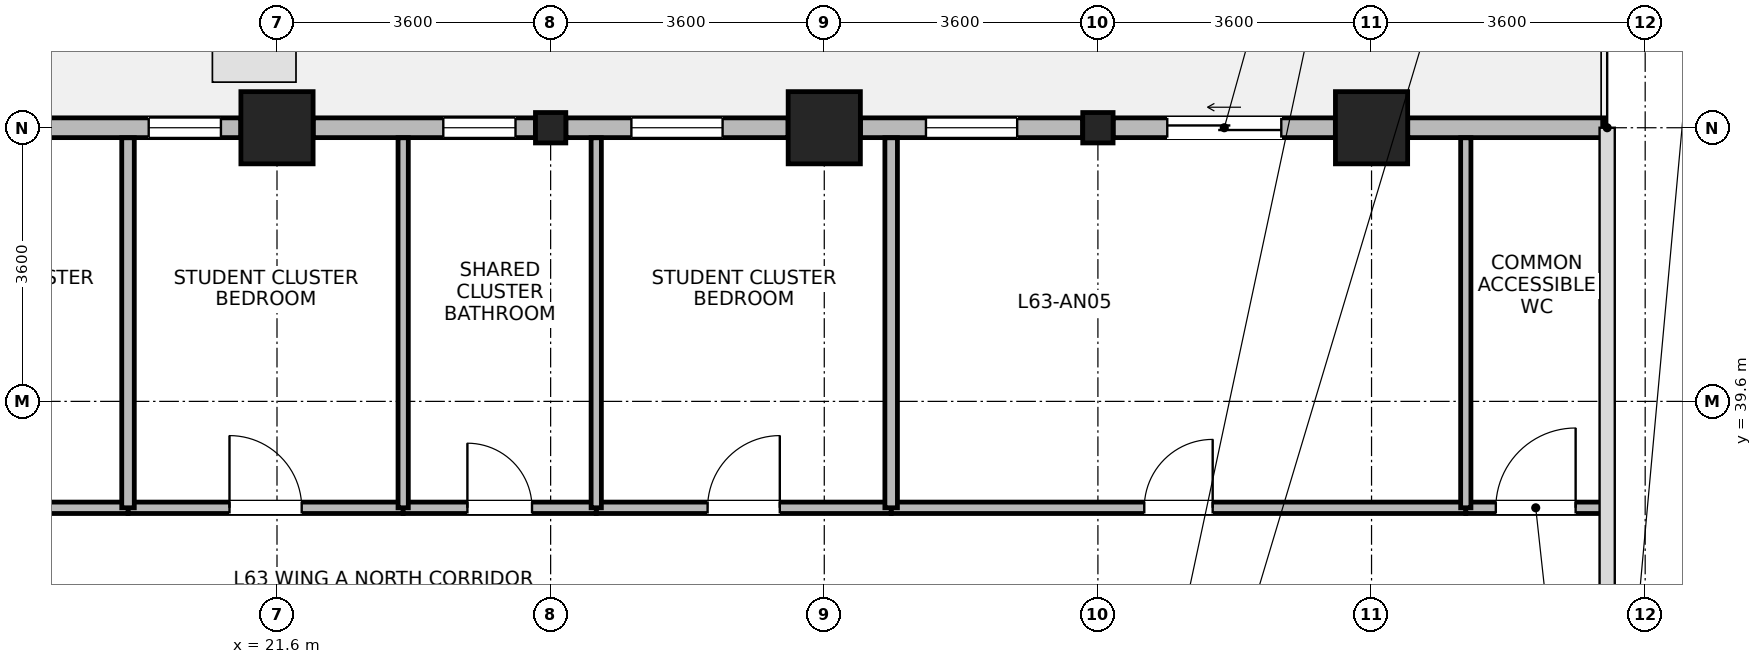
"""IFC4 building model, lengths in metres.
Left out: names, types, materials, properties, quantities, classifications, styles, units other than length and angle.
Written with IfcOpenShell. Run it as: python <this file> out.ifc"""

import sys

from ifc_helpers import new_model, si_unit, direction, frame, frame_2d, origin, origin_2d, place, context, subcontext, project, spatial, rectangle, i_section, extrude, source, transform, mapped, element, fill, save


model = new_model("IFC4")
c1 = context("Model", 3, precision=1e-05, world=origin(), true_north=direction((0.0, 1.0)))
c2 = subcontext(c1, "Body", "Model", "MODEL_VIEW")
j1 = project(units=[si_unit("LENGTHUNIT", "METRE"), si_unit("PLANEANGLEUNIT", "RADIAN")], contexts=[c1])
p1 = place(None, origin())
s1 = spatial("IfcSite", under=j1, at=p1, CompositionType="ELEMENT")
p2 = place(p1, origin())
s2 = spatial("IfcBuilding", under=s1, at=p2, CompositionType="ELEMENT")
p3 = place(p2, frame((0.0, 0.0, 246.2)))
s3 = spatial("IfcBuildingStorey", under=s2, at=p3, CompositionType="ELEMENT", Elevation=246.2)
m1 = source(origin(), c2, "Body", "SweptSolid", [
    extrude(rectangle(XDim=0.95, YDim=0.95, at=origin_2d()), origin(), (0.0, 0.0, 1.0), 3.7),
])
for number, where, z_axis, x_axis in (
    (1, (21.6, 43.2, 0.0), (0.0, 0.0, 1.0), (1.0, 0.0, 0.0)),
    (2, (28.8, 43.2, 0.0), (0.0, 0.0, 1.0), (1.0, 0.0, 0.0)),
    (3, (36.0, 43.2, 0.0), (0.0, 0.0, 1.0), (1.0, 0.0, 0.0)),
):
    element("IfcColumn", number, at=place(p3, frame(where, z_axis=z_axis, x_axis=x_axis)), inside=s3, PredefinedType="COLUMN", context=c2, shape_type="MappedRepresentation", body=[
        mapped(m1, transform((0.0, 0.0, 0.0), x_axis=(1.0, 0.0, 0.0), y_axis=(0.0, 1.0, 0.0), z_axis=(0.0, 0.0, 1.0), scale=1.0)),
    ])
m2 = source(origin(), c2, "Body", "SweptSolid", [
    extrude(i_section(OverallWidth=0.399, OverallDepth=0.4, WebThickness=0.017, FlangeThickness=0.023, FilletRadius=0.015, at=origin_2d()), origin(), (0.0, 0.0, 1.0), 3.7),
])
for number, where, z_axis, x_axis in (
    (4, (25.2, 43.2, 0.0), (0.0, 0.0, 1.0), (1.0, 0.0, 0.0)),
    (5, (32.4, 43.2, 0.0), (0.0, 0.0, 1.0), (1.0, 0.0, 0.0)),
):
    element("IfcColumn", number, at=place(p3, frame(where, z_axis=z_axis, x_axis=x_axis)), inside=s3, PredefinedType="COLUMN", context=c2, shape_type="MappedRepresentation", body=[
        mapped(m2, transform((0.0, 0.0, 0.0), x_axis=(1.0, 0.0, 0.0), y_axis=(0.0, 1.0, 0.0), z_axis=(0.0, 0.0, 1.0), scale=1.0)),
    ])
p4 = place(p3, frame((36.476, 43.2, 0.0), z_axis=(0.0, 0.0, 1.0), x_axis=(1.0, 0.0, 0.0)))
e6 = element("IfcWall", 6, at=p4, inside=s3, PredefinedType="STANDARD", context=c2, shape_type="SweptSolid", body=[
    extrude(rectangle(XDim=2.587, YDim=0.26, at=frame_2d((1.293, 0.0))), origin(), (0.0, 0.0, 1.0), 1.46),
])
p5 = place(p3, frame((32.601, 43.2, 0.0), z_axis=(0.0, 0.0, 1.0), x_axis=(1.0, 0.0, 0.0)))
e7 = element("IfcWall", 7, at=p5, inside=s3, PredefinedType="STANDARD", context=c2, shape_type="SweptSolid", body=[
    extrude(rectangle(XDim=2.923, YDim=0.26, at=frame_2d((1.462, 0.0))), origin(), (0.0, 0.0, 1.0), 2.86),
])
p6 = place(p5, frame((0.712, 0.0, 0.0)))
e8 = element("IfcOpeningElement", 8, at=p6, cuts=e7, PredefinedType="OPENING", context=c2, shape_type="SweptSolid", body=[
    extrude(rectangle(XDim=1.5, YDim=2.15, at=frame_2d((0.75, 1.075))), frame((0.0, 0.14, 0.0), z_axis=(0.0, -1.0, 0.0), x_axis=(1.0, 0.0, 0.0)), (0.0, 0.0, 1.0), 0.28),
])
p7 = place(p3, frame((29.276, 43.2, 0.0), z_axis=(0.0, 0.0, 1.0), x_axis=(1.0, 0.0, 0.0)))
e9 = element("IfcWall", 9, at=p7, inside=s3, PredefinedType="STANDARD", context=c2, shape_type="SweptSolid", body=[
    extrude(rectangle(XDim=2.924, YDim=0.26, at=frame_2d((1.462, 0.0))), origin(), (0.0, 0.0, 1.0), 2.86),
])
p8 = place(p7, frame((0.862, 0.0, 0.85)))
e10 = element("IfcOpeningElement", 10, at=p8, cuts=e9, PredefinedType="OPENING", context=c2, shape_type="SweptSolid", body=[
    extrude(rectangle(XDim=1.2, YDim=1.75, at=frame_2d((0.6, 0.875))), frame((0.0, 0.14, 0.0), z_axis=(0.0, -1.0, 0.0), x_axis=(1.0, 0.0, 0.0)), (0.0, 0.0, 1.0), 0.28),
])
p9 = place(p3, frame((25.4, 43.2, 0.0), z_axis=(0.0, 0.0, 1.0), x_axis=(1.0, 0.0, 0.0)))
e11 = element("IfcWall", 11, at=p9, inside=s3, PredefinedType="STANDARD", context=c2, shape_type="SweptSolid", body=[
    extrude(rectangle(XDim=2.924, YDim=0.26, at=frame_2d((1.462, 0.0))), origin(), (0.0, 0.0, 1.0), 2.86),
])
p10 = place(p9, frame((0.862, 0.0, 0.85)))
e12 = element("IfcOpeningElement", 12, at=p10, cuts=e11, PredefinedType="OPENING", context=c2, shape_type="SweptSolid", body=[
    extrude(rectangle(XDim=1.2, YDim=1.75, at=frame_2d((0.6, 0.875))), frame((0.0, 0.14, 0.0), z_axis=(0.0, -1.0, 0.0), x_axis=(1.0, 0.0, 0.0)), (0.0, 0.0, 1.0), 0.28),
])
p11 = place(p3, frame((22.076, 43.2, 0.0), z_axis=(0.0, 0.0, 1.0), x_axis=(1.0, 0.0, 0.0)))
e13 = element("IfcWall", 13, at=p11, inside=s3, PredefinedType="STANDARD", context=c2, shape_type="SweptSolid", body=[
    extrude(rectangle(XDim=2.924, YDim=0.26, at=frame_2d((1.462, 0.0))), origin(), (0.0, 0.0, 1.0), 2.86),
])
p12 = place(p11, frame((1.712, 0.0, 0.85)))
e14 = element("IfcOpeningElement", 14, at=p12, cuts=e13, PredefinedType="OPENING", context=c2, shape_type="SweptSolid", body=[
    extrude(rectangle(XDim=0.95, YDim=1.75, at=frame_2d((0.475, 0.875))), frame((0.0, 0.14, 0.0), z_axis=(0.0, -1.0, 0.0), x_axis=(1.0, 0.0, 0.0)), (0.0, 0.0, 1.0), 0.28),
])
p13 = place(p3, frame((18.2, 43.2, 0.0), z_axis=(0.0, 0.0, 1.0), x_axis=(1.0, 0.0, 0.0)))
e15 = element("IfcWall", 15, at=p13, inside=s3, PredefinedType="STANDARD", context=c2, shape_type="SweptSolid", body=[
    extrude(rectangle(XDim=2.924, YDim=0.26, at=frame_2d((1.462, 0.0))), origin(), (0.0, 0.0, 1.0), 2.86),
])
p14 = place(p13, frame((1.712, 0.0, 0.85)))
e16 = element("IfcOpeningElement", 16, at=p14, cuts=e15, PredefinedType="OPENING", context=c2, shape_type="SweptSolid", body=[
    extrude(rectangle(XDim=0.95, YDim=1.75, at=frame_2d((0.475, 0.875))), frame((0.0, 0.14, 0.0), z_axis=(0.0, -1.0, 0.0), x_axis=(1.0, 0.0, 0.0)), (0.0, 0.0, 1.0), 0.28),
])
p15 = place(p3, frame((29.68, 38.2, 0.0), z_axis=(0.0, 0.0, 1.0), x_axis=(1.0, 0.0, 0.0)))
e17 = element("IfcWall", 17, at=p15, inside=s3, PredefinedType="PARTITIONING", context=c2, shape_type="SweptSolid", body=[
    extrude(rectangle(XDim=7.56, YDim=0.15, at=frame_2d((3.78, 0.0))), origin(), (0.0, 0.0, 1.0), 3.26),
])
p16 = place(p15, frame((3.33, 0.0, 0.0)))
e18 = element("IfcOpeningElement", 18, at=p16, cuts=e17, PredefinedType="OPENING", context=c2, shape_type="SweptSolid", body=[
    extrude(rectangle(XDim=0.9, YDim=2.08, at=frame_2d((0.45, 1.04))), frame((0.0, 0.085, 0.0), z_axis=(0.0, -1.0, 0.0), x_axis=(1.0, 0.0, 0.0)), (0.0, 0.0, 1.0), 0.17),
])
p17 = place(p3, frame((25.8, 38.2, 0.0), z_axis=(0.0, 0.0, 1.0), x_axis=(1.0, 0.0, 0.0)))
e19 = element("IfcWall", 19, at=p17, inside=s3, PredefinedType="PARTITIONING", context=c2, shape_type="SweptSolid", body=[
    extrude(rectangle(XDim=3.88, YDim=0.15, at=frame_2d((1.94, 0.0))), origin(), (0.0, 0.0, 1.0), 3.26),
])
p18 = place(p17, frame((1.465, 0.0, 0.0)))
e20 = element("IfcOpeningElement", 20, at=p18, cuts=e19, PredefinedType="OPENING", context=c2, shape_type="SweptSolid", body=[
    extrude(rectangle(XDim=0.95, YDim=2.1, at=frame_2d((0.475, 1.05))), frame((0.0, 0.085, 0.0), z_axis=(0.0, -1.0, 0.0), x_axis=(1.0, 0.0, 0.0)), (0.0, 0.0, 1.0), 0.17),
])
p19 = place(p3, frame((19.64, 38.2, 0.0), z_axis=(0.0, 0.0, 1.0), x_axis=(1.0, 0.0, 0.0)))
e21 = element("IfcWall", 21, at=p19, inside=s3, PredefinedType="PARTITIONING", context=c2, shape_type="SweptSolid", body=[
    extrude(rectangle(XDim=3.62, YDim=0.15, at=frame_2d((1.81, 0.0))), origin(), (0.0, 0.0, 1.0), 3.26),
])
p20 = place(p19, frame((1.335, 0.0, 0.0)))
e22 = element("IfcOpeningElement", 22, at=p20, cuts=e21, PredefinedType="OPENING", context=c2, shape_type="SweptSolid", body=[
    extrude(rectangle(XDim=0.95, YDim=2.1, at=frame_2d((0.475, 1.05))), frame((0.0, 0.085, 0.0), z_axis=(0.0, -1.0, 0.0), x_axis=(1.0, 0.0, 0.0)), (0.0, 0.0, 1.0), 0.17),
])
p21 = place(p3, frame((16.3, 38.2, 0.0), z_axis=(0.0, 0.0, 1.0), x_axis=(1.0, 0.0, 0.0)))
e23 = element("IfcWall", 23, at=p21, inside=s3, PredefinedType="PARTITIONING", context=c2, shape_type="SweptSolid", body=[
    extrude(rectangle(XDim=3.34, YDim=0.15, at=frame_2d((1.67, 0.0))), origin(), (0.0, 0.0, 1.0), 3.26),
])
p22 = place(p21, frame((1.195, 0.0, 0.0)))
e24 = element("IfcOpeningElement", 24, at=p22, cuts=e23, PredefinedType="OPENING", context=c2, shape_type="SweptSolid", body=[
    extrude(rectangle(XDim=0.95, YDim=2.1, at=frame_2d((0.475, 1.05))), frame((0.0, 0.085, 0.0), z_axis=(0.0, -1.0, 0.0), x_axis=(1.0, 0.0, 0.0)), (0.0, 0.0, 1.0), 0.17),
])
p23 = place(p3, frame((23.26, 38.2, 0.0), z_axis=(0.0, 0.0, 1.0), x_axis=(1.0, 0.0, 0.0)))
e25 = element("IfcWall", 25, at=p23, inside=s3, PredefinedType="PARTITIONING", context=c2, shape_type="SweptSolid", body=[
    extrude(rectangle(XDim=2.54, YDim=0.15, at=frame_2d((1.27, 0.0))), origin(), (0.0, 0.0, 1.0), 3.26),
])
p24 = place(p23, frame((0.845, 0.0, 0.0)))
e26 = element("IfcOpeningElement", 26, at=p24, cuts=e25, PredefinedType="OPENING", context=c2, shape_type="SweptSolid", body=[
    extrude(rectangle(XDim=0.85, YDim=2.04, at=frame_2d((0.425, 1.02))), frame((0.0, 0.085, 0.0), z_axis=(0.0, -1.0, 0.0), x_axis=(1.0, 0.0, 0.0)), (0.0, 0.0, 1.0), 0.17),
])
p25 = place(p3, frame((37.24, 38.2, 0.0), z_axis=(0.0, 0.0, 1.0), x_axis=(1.0, 0.0, 0.0)))
e27 = element("IfcWall", 27, at=p25, inside=s3, PredefinedType="PARTITIONING", context=c2, shape_type="SweptSolid", body=[
    extrude(rectangle(XDim=1.84, YDim=0.15, at=frame_2d((0.92, 0.0))), origin(), (0.0, 0.0, 1.0), 3.26),
])
p26 = place(p25, frame((0.395, 0.0, 0.0)))
e28 = element("IfcOpeningElement", 28, at=p26, cuts=e27, PredefinedType="OPENING", context=c2, shape_type="SweptSolid", body=[
    extrude(rectangle(XDim=1.05, YDim=2.12, at=frame_2d((0.525, 1.06))), frame((0.0, 0.085, 0.0), z_axis=(0.0, -1.0, 0.0), x_axis=(1.0, 0.0, 0.0)), (0.0, 0.0, 1.0), 0.17),
])
p27 = place(p3, frame((19.64, 38.2, 0.0), z_axis=(0.0, 0.0, 1.0), x_axis=(0.0, 1.0, 0.0)))
e29 = element("IfcWall", 29, at=p27, inside=s3, PredefinedType="PARTITIONING", context=c2, shape_type="SweptSolid", body=[
    extrude(rectangle(XDim=4.868, YDim=0.165, at=frame_2d((2.434, 0.0))), origin(), (0.0, 0.0, 1.0), 3.26),
])
for number, where, z_axis, x_axis in (
    (30, (23.26, 38.2, 0.0), (0.0, 0.0, 1.0), (0.0, 1.0, 0.0)),
    (31, (25.8, 38.2, 0.0), (0.0, 0.0, 1.0), (0.0, 1.0, 0.0)),
):
    element("IfcWall", number, at=place(p3, frame(where, z_axis=z_axis, x_axis=x_axis)), inside=s3, PredefinedType="PARTITIONING", context=c2, shape_type="SweptSolid", body=[
        extrude(rectangle(XDim=4.868, YDim=0.135, at=frame_2d((2.434, 0.0))), origin(), (0.0, 0.0, 1.0), 3.26),
    ])
p28 = place(p3, frame((29.68, 38.2, 0.0), z_axis=(0.0, 0.0, 1.0), x_axis=(0.0, 1.0, 0.0)))
e32 = element("IfcWall", 32, at=p28, inside=s3, PredefinedType="PARTITIONING", context=c2, shape_type="SweptSolid", body=[
    extrude(rectangle(XDim=4.868, YDim=0.165, at=frame_2d((2.434, 0.0))), origin(), (0.0, 0.0, 1.0), 3.26),
])
p29 = place(p3, frame((37.24, 38.2, 0.0), z_axis=(0.0, 0.0, 1.0), x_axis=(0.0, 1.0, 0.0)))
e33 = element("IfcWall", 33, at=p29, inside=s3, PredefinedType="PARTITIONING", context=c2, shape_type="SweptSolid", body=[
    extrude(rectangle(XDim=4.868, YDim=0.135, at=frame_2d((2.434, 0.0))), origin(), (0.0, 0.0, 1.0), 3.26),
])
p30 = place(p6, origin())
e34 = element("IfcDoor", 34, at=p30, inside=s3, OperationType="SLIDING_TO_LEFT", PredefinedType="DOOR", context=c2, shape_type="SweptSolid", body=[
    extrude(rectangle(XDim=1.5, YDim=2.15, at=frame_2d((0.75, 1.075))), frame((0.0, 0.025, 0.0), z_axis=(0.0, -1.0, 0.0), x_axis=(1.0, 0.0, 0.0)), (0.0, 0.0, 1.0), 0.05),
])
fill(e8, e34)
p31 = place(p8, origin())
e35 = element("IfcWindow", 35, at=p31, inside=s3, PartitioningType="SINGLE_PANEL", PredefinedType="WINDOW", context=c2, shape_type="SweptSolid", body=[
    extrude(rectangle(XDim=1.2, YDim=1.75, at=frame_2d((0.6, 0.875))), frame((0.0, 0.03, 0.0), z_axis=(0.0, -1.0, 0.0), x_axis=(1.0, 0.0, 0.0)), (0.0, 0.0, 1.0), 0.06),
])
fill(e10, e35)
p32 = place(p10, origin())
e36 = element("IfcWindow", 36, at=p32, inside=s3, PartitioningType="SINGLE_PANEL", PredefinedType="WINDOW", context=c2, shape_type="SweptSolid", body=[
    extrude(rectangle(XDim=1.2, YDim=1.75, at=frame_2d((0.6, 0.875))), frame((0.0, 0.03, 0.0), z_axis=(0.0, -1.0, 0.0), x_axis=(1.0, 0.0, 0.0)), (0.0, 0.0, 1.0), 0.06),
])
fill(e12, e36)
p33 = place(p12, origin())
e37 = element("IfcWindow", 37, at=p33, inside=s3, PartitioningType="SINGLE_PANEL", PredefinedType="WINDOW", context=c2, shape_type="SweptSolid", body=[
    extrude(rectangle(XDim=0.95, YDim=1.75, at=frame_2d((0.475, 0.875))), frame((0.0, 0.03, 0.0), z_axis=(0.0, -1.0, 0.0), x_axis=(1.0, 0.0, 0.0)), (0.0, 0.0, 1.0), 0.06),
])
fill(e14, e37)
p34 = place(p14, origin())
e38 = element("IfcWindow", 38, at=p34, inside=s3, PartitioningType="SINGLE_PANEL", PredefinedType="WINDOW", context=c2, shape_type="SweptSolid", body=[
    extrude(rectangle(XDim=0.95, YDim=1.75, at=frame_2d((0.475, 0.875))), frame((0.0, 0.03, 0.0), z_axis=(0.0, -1.0, 0.0), x_axis=(1.0, 0.0, 0.0)), (0.0, 0.0, 1.0), 0.06),
])
fill(e16, e38)
p35 = place(p16, origin())
e39 = element("IfcDoor", 39, at=p35, inside=s3, OperationType="SINGLE_SWING_RIGHT", PredefinedType="DOOR", context=c2, shape_type="SweptSolid", body=[
    extrude(rectangle(XDim=0.9, YDim=2.08, at=frame_2d((0.45, 1.04))), frame((0.0, 0.025, 0.0), z_axis=(0.0, -1.0, 0.0), x_axis=(1.0, 0.0, 0.0)), (0.0, 0.0, 1.0), 0.05),
])
fill(e18, e39)
p36 = place(p18, origin())
e40 = element("IfcDoor", 40, at=p36, inside=s3, OperationType="SINGLE_SWING_RIGHT", PredefinedType="DOOR", context=c2, shape_type="SweptSolid", body=[
    extrude(rectangle(XDim=0.95, YDim=2.1, at=frame_2d((0.475, 1.05))), frame((0.0, 0.025, 0.0), z_axis=(0.0, -1.0, 0.0), x_axis=(1.0, 0.0, 0.0)), (0.0, 0.0, 1.0), 0.05),
])
fill(e20, e40)
p37 = place(p20, origin())
e41 = element("IfcDoor", 41, at=p37, inside=s3, OperationType="SINGLE_SWING_LEFT", PredefinedType="DOOR", context=c2, shape_type="SweptSolid", body=[
    extrude(rectangle(XDim=0.95, YDim=2.1, at=frame_2d((0.475, 1.05))), frame((0.0, 0.025, 0.0), z_axis=(0.0, -1.0, 0.0), x_axis=(1.0, 0.0, 0.0)), (0.0, 0.0, 1.0), 0.05),
])
fill(e22, e41)
p38 = place(p24, origin())
e42 = element("IfcDoor", 42, at=p38, inside=s3, OperationType="SINGLE_SWING_LEFT", PredefinedType="DOOR", context=c2, shape_type="SweptSolid", body=[
    extrude(rectangle(XDim=0.85, YDim=2.04, at=frame_2d((0.425, 1.02))), frame((0.0, 0.025, 0.0), z_axis=(0.0, -1.0, 0.0), x_axis=(1.0, 0.0, 0.0)), (0.0, 0.0, 1.0), 0.05),
])
fill(e26, e42)
p39 = place(p26, origin())
e43 = element("IfcDoor", 43, at=p39, inside=s3, OperationType="SINGLE_SWING_RIGHT", PredefinedType="DOOR", context=c2, shape_type="SweptSolid", body=[
    extrude(rectangle(XDim=1.05, YDim=2.12, at=frame_2d((0.525, 1.06))), frame((0.0, 0.025, 0.0), z_axis=(0.0, -1.0, 0.0), x_axis=(1.0, 0.0, 0.0)), (0.0, 0.0, 1.0), 0.05),
])
fill(e28, e43)
save(model, sys.argv[1])
